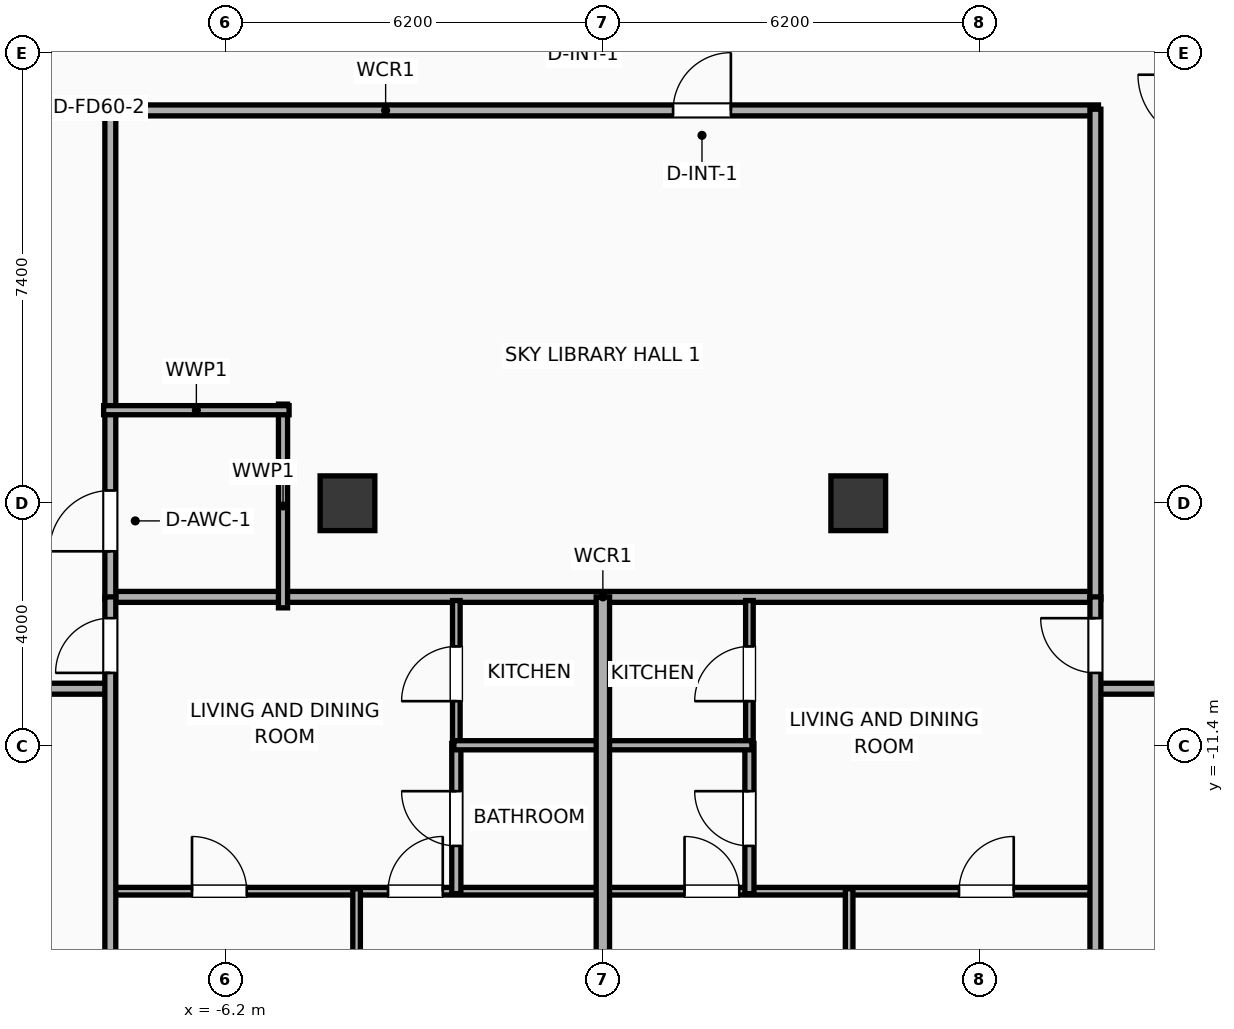
"""IFC4 building model, lengths in metres.
Left out: names, types, materials, properties, quantities, classifications, styles, units other than length and angle.
Written with IfcOpenShell. Run it as: python <this file> out.ifc"""

import sys

from ifc_helpers import new_model, si_unit, direction, frame, frame_2d, origin, origin_2d, place, context, subcontext, project, spatial, rectangle, extrude, element, fill, save


model = new_model("IFC4")
c1 = context("Model", 3, precision=1e-05, world=origin(), true_north=direction((0.0, 1.0)))
c2 = subcontext(c1, "Body", "Model", "MODEL_VIEW")
j1 = project(units=[si_unit("LENGTHUNIT", "METRE"), si_unit("PLANEANGLEUNIT", "RADIAN")], contexts=[c1])
p1 = place(None, origin())
s1 = spatial("IfcSite", under=j1, at=p1, CompositionType="ELEMENT")
p2 = place(p1, origin())
s2 = spatial("IfcBuilding", under=s1, at=p2, CompositionType="ELEMENT")
p3 = place(p2, frame((0.0, 0.0, 163.8)))
s3 = spatial("IfcBuildingStorey", under=s2, at=p3, CompositionType="ELEMENT", Elevation=163.8)
for number, where, z_axis, x_axis in (
    (1, (-4.2, -7.4, 0.0), (0.0, 0.0, 1.0), (1.0, 0.0, 0.0)),
    (2, (4.2, -7.4, 0.0), (0.0, 0.0, 1.0), (1.0, 0.0, 0.0)),
):
    element("IfcColumn", number, at=place(p3, frame(where, z_axis=z_axis, x_axis=x_axis)), inside=s3, PredefinedType="COLUMN", context=c2, shape_type="SweptSolid", body=[
        extrude(rectangle(XDim=0.9, YDim=0.9, at=origin_2d()), origin(), (0.0, 0.0, 1.0), 3.9),
    ])
p4 = place(p3, frame((-8.15, -8.94, 0.0), z_axis=(0.0, 0.0, 1.0), x_axis=(1.0, 0.0, 0.0)))
e3 = element("IfcWall", 3, at=p4, inside=s3, PredefinedType="PARTITIONING", context=c2, shape_type="SweptSolid", body=[
    extrude(rectangle(XDim=16.3, YDim=0.18, at=frame_2d((8.15, 0.0))), origin(), (0.0, 0.0, 1.0), 3.65),
])
p5 = place(p3, frame((-8.15, -0.94, 0.0), z_axis=(0.0, 0.0, 1.0), x_axis=(1.0, 0.0, 0.0)))
e4 = element("IfcWall", 4, at=p5, inside=s3, PredefinedType="PARTITIONING", context=c2, shape_type="SweptSolid", body=[
    extrude(rectangle(XDim=16.3, YDim=0.18, at=frame_2d((8.15, 0.0))), origin(), (0.0, 0.0, 1.0), 3.65),
])
p6 = place(p5, frame((9.305, 0.0, 0.0)))
e5 = element("IfcOpeningElement", 5, at=p6, cuts=e4, PredefinedType="OPENING", context=c2, shape_type="SweptSolid", body=[
    extrude(rectangle(XDim=0.95, YDim=2.05, at=frame_2d((0.475, 1.025))), frame((0.0, 0.1, 0.0), z_axis=(0.0, -1.0, 0.0), x_axis=(1.0, 0.0, 0.0)), (0.0, 0.0, 1.0), 0.2),
])
p7 = place(p3, frame((-8.1, -8.98, 0.0), z_axis=(0.0, 0.0, 1.0), x_axis=(0.0, 1.0, 0.0)))
e6 = element("IfcWall", 6, at=p7, inside=s3, PredefinedType="PARTITIONING", context=c2, shape_type="SweptSolid", body=[
    extrude(rectangle(XDim=8.06, YDim=0.18, at=frame_2d((4.03, 0.0))), origin(), (0.0, 0.0, 1.0), 3.65),
])
p8 = place(p7, frame((0.79, 0.0, 0.0)))
e7 = element("IfcOpeningElement", 7, at=p8, cuts=e6, PredefinedType="OPENING", context=c2, shape_type="SweptSolid", body=[
    extrude(rectangle(XDim=1.0, YDim=2.05, at=frame_2d((0.5, 1.025))), frame((0.0, 0.1, 0.0), z_axis=(0.0, -1.0, 0.0), x_axis=(1.0, 0.0, 0.0)), (0.0, 0.0, 1.0), 0.2),
])
p9 = place(p3, frame((8.1, -8.98, 0.0), z_axis=(0.0, 0.0, 1.0), x_axis=(0.0, 1.0, 0.0)))
e8 = element("IfcWall", 8, at=p9, inside=s3, PredefinedType="PARTITIONING", context=c2, shape_type="SweptSolid", body=[
    extrude(rectangle(XDim=8.06, YDim=0.18, at=frame_2d((4.03, 0.0))), origin(), (0.0, 0.0, 1.0), 3.65),
])
p10 = place(p3, frame((-5.26, -9.12, 0.0), z_axis=(0.0, 0.0, 1.0), x_axis=(0.0, 1.0, 0.0)))
e9 = element("IfcWall", 9, at=p10, inside=s3, PredefinedType="PLUMBINGWALL", context=c2, shape_type="SweptSolid", body=[
    extrude(rectangle(XDim=3.35, YDim=0.15, at=frame_2d((1.675, 0.0))), origin(), (0.0, 0.0, 1.0), 3.65),
])
p11 = place(p3, frame((-8.21, -5.87, 0.0), z_axis=(0.0, 0.0, 1.0), x_axis=(1.0, 0.0, 0.0)))
e10 = element("IfcWall", 10, at=p11, inside=s3, PredefinedType="PLUMBINGWALL", context=c2, shape_type="SweptSolid", body=[
    extrude(rectangle(XDim=3.05, YDim=0.15, at=frame_2d((1.525, 0.0))), origin(), (0.0, 0.0, 1.0), 3.65),
])
p12 = place(p3, frame((-19.75, -10.45, 0.0), z_axis=(0.0, 0.0, 1.0), x_axis=(1.0, 0.0, 0.0)))
e11 = element("IfcWall", 11, at=p12, inside=s3, PredefinedType="PARTITIONING", context=c2, shape_type="SweptSolid", body=[
    extrude(rectangle(XDim=11.67, YDim=0.18, at=frame_2d((5.835, 0.0))), origin(), (0.0, 0.0, 1.0), 3.65),
])
p13 = place(p12, frame((2.664, 0.0, 0.0)))
e12 = element("IfcOpeningElement", 12, at=p13, cuts=e11, PredefinedType="OPENING", context=c2, shape_type="SweptSolid", body=[
    extrude(rectangle(XDim=0.9, YDim=2.05, at=frame_2d((0.45, 1.025))), frame((0.0, 0.1, 0.0), z_axis=(0.0, -1.0, 0.0), x_axis=(1.0, 0.0, 0.0)), (0.0, 0.0, 1.0), 0.2),
])
p14 = place(p12, frame((9.404, 0.0, 0.0)))
e13 = element("IfcOpeningElement", 13, at=p14, cuts=e11, PredefinedType="OPENING", context=c2, shape_type="SweptSolid", body=[
    extrude(rectangle(XDim=1.15, YDim=2.05, at=frame_2d((0.575, 1.025))), frame((0.0, 0.1, 0.0), z_axis=(0.0, -1.0, 0.0), x_axis=(1.0, 0.0, 0.0)), (0.0, 0.0, 1.0), 0.2),
])
p15 = place(p3, frame((8.08, -10.45, 0.0), z_axis=(0.0, 0.0, 1.0), x_axis=(1.0, 0.0, 0.0)))
e14 = element("IfcWall", 14, at=p15, inside=s3, PredefinedType="PARTITIONING", context=c2, shape_type="SweptSolid", body=[
    extrude(rectangle(XDim=11.67, YDim=0.18, at=frame_2d((5.835, 0.0))), origin(), (0.0, 0.0, 1.0), 3.65),
])
p16 = place(p15, frame((1.213, 0.0, 0.0)))
e15 = element("IfcOpeningElement", 15, at=p16, cuts=e14, PredefinedType="OPENING", context=c2, shape_type="SweptSolid", body=[
    extrude(rectangle(XDim=1.15, YDim=2.05, at=frame_2d((0.575, 1.025))), frame((0.0, 0.1, 0.0), z_axis=(0.0, -1.0, 0.0), x_axis=(1.0, 0.0, 0.0)), (0.0, 0.0, 1.0), 0.2),
])
p17 = place(p15, frame((7.057, 0.0, 0.0)))
e16 = element("IfcOpeningElement", 16, at=p17, cuts=e14, PredefinedType="OPENING", context=c2, shape_type="SweptSolid", body=[
    extrude(rectangle(XDim=1.15, YDim=2.05, at=frame_2d((0.575, 1.025))), frame((0.0, 0.1, 0.0), z_axis=(0.0, -1.0, 0.0), x_axis=(1.0, 0.0, 0.0)), (0.0, 0.0, 1.0), 0.2),
])
p18 = place(p3, frame((-8.08, -13.78, 0.0), z_axis=(0.0, 0.0, 1.0), x_axis=(1.0, 0.0, 0.0)))
e17 = element("IfcWall", 17, at=p18, inside=s3, PredefinedType="PARTITIONING", context=c2, shape_type="SweptSolid", body=[
    extrude(rectangle(XDim=8.06, YDim=0.125, at=frame_2d((4.03, 0.0))), origin(), (0.0, 0.0, 1.0), 3.65),
])
p19 = place(p18, frame((1.323, 0.0, 0.0)))
e18 = element("IfcOpeningElement", 18, at=p19, cuts=e17, PredefinedType="OPENING", context=c2, shape_type="SweptSolid", body=[
    extrude(rectangle(XDim=0.9, YDim=2.05, at=frame_2d((0.45, 1.025))), frame((0.0, 0.073, 0.0), z_axis=(0.0, -1.0, 0.0), x_axis=(1.0, 0.0, 0.0)), (0.0, 0.0, 1.0), 0.145),
])
p20 = place(p18, frame((4.547, 0.0, 0.0)))
e19 = element("IfcOpeningElement", 19, at=p20, cuts=e17, PredefinedType="OPENING", context=c2, shape_type="SweptSolid", body=[
    extrude(rectangle(XDim=0.9, YDim=2.05, at=frame_2d((0.45, 1.025))), frame((0.0, 0.073, 0.0), z_axis=(0.0, -1.0, 0.0), x_axis=(1.0, 0.0, 0.0)), (0.0, 0.0, 1.0), 0.145),
])
p21 = place(p3, frame((-2.41, -11.41, 0.0), z_axis=(0.0, 0.0, 1.0), x_axis=(0.0, 1.0, 0.0)))
e20 = element("IfcWall", 20, at=p21, inside=s3, PredefinedType="PARTITIONING", context=c2, shape_type="SweptSolid", body=[
    extrude(rectangle(XDim=2.41, YDim=0.125, at=frame_2d((1.205, 0.0))), origin(), (0.0, 0.0, 1.0), 3.65),
])
p22 = place(p21, frame((0.755, 0.0, 0.0)))
e21 = element("IfcOpeningElement", 21, at=p22, cuts=e20, PredefinedType="OPENING", context=c2, shape_type="SweptSolid", body=[
    extrude(rectangle(XDim=0.9, YDim=2.05, at=frame_2d((0.45, 1.025))), frame((0.0, 0.073, 0.0), z_axis=(0.0, -1.0, 0.0), x_axis=(1.0, 0.0, 0.0)), (0.0, 0.0, 1.0), 0.145),
])
p23 = place(p3, frame((-2.41, -13.82, 0.0), z_axis=(0.0, 0.0, 1.0), x_axis=(0.0, 1.0, 0.0)))
e22 = element("IfcWall", 22, at=p23, inside=s3, PredefinedType="PLUMBINGWALL", context=c2, shape_type="SweptSolid", body=[
    extrude(rectangle(XDim=2.47, YDim=0.15, at=frame_2d((1.235, 0.0))), origin(), (0.0, 0.0, 1.0), 3.65),
])
p24 = place(p23, frame((0.785, 0.0, 0.0)))
e23 = element("IfcOpeningElement", 23, at=p24, cuts=e22, PredefinedType="OPENING", context=c2, shape_type="SweptSolid", body=[
    extrude(rectangle(XDim=0.9, YDim=2.05, at=frame_2d((0.45, 1.025))), frame((0.0, 0.085, 0.0), z_axis=(0.0, -1.0, 0.0), x_axis=(1.0, 0.0, 0.0)), (0.0, 0.0, 1.0), 0.17),
])
p25 = place(p3, frame((-2.45, -11.38, 0.0), z_axis=(0.0, 0.0, 1.0), x_axis=(1.0, 0.0, 0.0)))
e24 = element("IfcWall", 24, at=p25, inside=s3, PredefinedType="PLUMBINGWALL", context=c2, shape_type="SweptSolid", body=[
    extrude(rectangle(XDim=2.43, YDim=0.15, at=frame_2d((1.215, 0.0))), origin(), (0.0, 0.0, 1.0), 3.65),
])
p26 = place(p3, frame((-4.05, -21.031, 0.0), z_axis=(0.0, 0.0, 1.0), x_axis=(0.0, 1.0, 0.0)))
e25 = element("IfcWall", 25, at=p26, inside=s3, PredefinedType="PARTITIONING", context=c2, shape_type="SweptSolid", body=[
    extrude(rectangle(XDim=7.291, YDim=0.125, at=frame_2d((3.646, 0.0))), origin(), (0.0, 0.0, 1.0), 3.65),
])
p27 = place(p3, frame((-8.1, -21.456, 0.0), z_axis=(0.0, 0.0, 1.0), x_axis=(0.0, 1.0, 0.0)))
e26 = element("IfcWall", 26, at=p27, inside=s3, PredefinedType="PARTITIONING", context=c2, shape_type="SweptSolid", body=[
    extrude(rectangle(XDim=12.516, YDim=0.18, at=frame_2d((6.258, 0.0))), origin(), (0.0, 0.0, 1.0), 3.65),
])
p28 = place(p27, frame((11.267, 0.0, 0.0)))
e27 = element("IfcOpeningElement", 27, at=p28, cuts=e26, PredefinedType="OPENING", context=c2, shape_type="SweptSolid", body=[
    extrude(rectangle(XDim=0.9, YDim=2.05, at=frame_2d((0.45, 1.025))), frame((0.0, 0.1, 0.0), z_axis=(0.0, -1.0, 0.0), x_axis=(1.0, 0.0, 0.0)), (0.0, 0.0, 1.0), 0.2),
])
p29 = place(p3, frame((0.02, -13.78, 0.0), z_axis=(0.0, 0.0, 1.0), x_axis=(1.0, 0.0, 0.0)))
e28 = element("IfcWall", 28, at=p29, inside=s3, PredefinedType="PARTITIONING", context=c2, shape_type="SweptSolid", body=[
    extrude(rectangle(XDim=8.06, YDim=0.125, at=frame_2d((4.03, 0.0))), origin(), (0.0, 0.0, 1.0), 3.65),
])
p30 = place(p29, frame((1.323, 0.0, 0.0)))
e29 = element("IfcOpeningElement", 29, at=p30, cuts=e28, PredefinedType="OPENING", context=c2, shape_type="SweptSolid", body=[
    extrude(rectangle(XDim=0.9, YDim=2.05, at=frame_2d((0.45, 1.025))), frame((0.0, 0.073, 0.0), z_axis=(0.0, -1.0, 0.0), x_axis=(1.0, 0.0, 0.0)), (0.0, 0.0, 1.0), 0.145),
])
p31 = place(p29, frame((5.837, 0.0, 0.0)))
e30 = element("IfcOpeningElement", 30, at=p31, cuts=e28, PredefinedType="OPENING", context=c2, shape_type="SweptSolid", body=[
    extrude(rectangle(XDim=0.9, YDim=2.05, at=frame_2d((0.45, 1.025))), frame((0.0, 0.073, 0.0), z_axis=(0.0, -1.0, 0.0), x_axis=(1.0, 0.0, 0.0)), (0.0, 0.0, 1.0), 0.145),
])
p32 = place(p3, frame((2.41, -11.41, 0.0), z_axis=(0.0, 0.0, 1.0), x_axis=(0.0, 1.0, 0.0)))
e31 = element("IfcWall", 31, at=p32, inside=s3, PredefinedType="PARTITIONING", context=c2, shape_type="SweptSolid", body=[
    extrude(rectangle(XDim=2.41, YDim=0.125, at=frame_2d((1.205, 0.0))), origin(), (0.0, 0.0, 1.0), 3.65),
])
p33 = place(p32, frame((0.755, 0.0, 0.0)))
e32 = element("IfcOpeningElement", 32, at=p33, cuts=e31, PredefinedType="OPENING", context=c2, shape_type="SweptSolid", body=[
    extrude(rectangle(XDim=0.9, YDim=2.05, at=frame_2d((0.45, 1.025))), frame((0.0, 0.073, 0.0), z_axis=(0.0, -1.0, 0.0), x_axis=(1.0, 0.0, 0.0)), (0.0, 0.0, 1.0), 0.145),
])
p34 = place(p3, frame((2.41, -13.82, 0.0), z_axis=(0.0, 0.0, 1.0), x_axis=(0.0, 1.0, 0.0)))
e33 = element("IfcWall", 33, at=p34, inside=s3, PredefinedType="PLUMBINGWALL", context=c2, shape_type="SweptSolid", body=[
    extrude(rectangle(XDim=2.47, YDim=0.15, at=frame_2d((1.235, 0.0))), origin(), (0.0, 0.0, 1.0), 3.65),
])
p35 = place(p34, frame((0.785, 0.0, 0.0)))
e34 = element("IfcOpeningElement", 34, at=p35, cuts=e33, PredefinedType="OPENING", context=c2, shape_type="SweptSolid", body=[
    extrude(rectangle(XDim=0.9, YDim=2.05, at=frame_2d((0.45, 1.025))), frame((0.0, 0.085, 0.0), z_axis=(0.0, -1.0, 0.0), x_axis=(1.0, 0.0, 0.0)), (0.0, 0.0, 1.0), 0.17),
])
p36 = place(p3, frame((0.02, -11.38, 0.0), z_axis=(0.0, 0.0, 1.0), x_axis=(1.0, 0.0, 0.0)))
e35 = element("IfcWall", 35, at=p36, inside=s3, PredefinedType="PLUMBINGWALL", context=c2, shape_type="SweptSolid", body=[
    extrude(rectangle(XDim=2.43, YDim=0.15, at=frame_2d((1.215, 0.0))), origin(), (0.0, 0.0, 1.0), 3.65),
])
p37 = place(p3, frame((4.05, -20.179, 0.0), z_axis=(0.0, 0.0, 1.0), x_axis=(0.0, 1.0, 0.0)))
e36 = element("IfcWall", 36, at=p37, inside=s3, PredefinedType="PARTITIONING", context=c2, shape_type="SweptSolid", body=[
    extrude(rectangle(XDim=6.439, YDim=0.125, at=frame_2d((3.22, 0.0))), origin(), (0.0, 0.0, 1.0), 3.04),
])
p38 = place(p3, frame((8.1, -19.754, 0.0), z_axis=(0.0, 0.0, 1.0), x_axis=(0.0, 1.0, 0.0)))
e37 = element("IfcWall", 37, at=p38, inside=s3, PredefinedType="PARTITIONING", context=c2, shape_type="SweptSolid", body=[
    extrude(rectangle(XDim=10.814, YDim=0.18, at=frame_2d((5.407, 0.0))), origin(), (0.0, 0.0, 1.0), 3.65),
])
p39 = place(p38, frame((9.564, 0.0, 0.0)))
e38 = element("IfcOpeningElement", 38, at=p39, cuts=e37, PredefinedType="OPENING", context=c2, shape_type="SweptSolid", body=[
    extrude(rectangle(XDim=0.9, YDim=2.05, at=frame_2d((0.45, 1.025))), frame((0.0, 0.1, 0.0), z_axis=(0.0, -1.0, 0.0), x_axis=(1.0, 0.0, 0.0)), (0.0, 0.0, 1.0), 0.2),
])
p40 = place(p3, frame((0.0, -20.605, 0.0), z_axis=(0.0, 0.0, 1.0), x_axis=(0.0, 1.0, 0.0)))
e39 = element("IfcWall", 39, at=p40, inside=s3, PredefinedType="PARTITIONING", context=c2, shape_type="SweptSolid", body=[
    extrude(rectangle(XDim=11.665, YDim=0.22, at=frame_2d((5.833, 0.0))), origin(), (0.0, 0.0, 1.0), 3.65),
])
p41 = place(p6, origin())
e40 = element("IfcDoor", 40, at=p41, inside=s3, OperationType="SINGLE_SWING_RIGHT", PredefinedType="DOOR", context=c2, shape_type="SweptSolid", body=[
    extrude(rectangle(XDim=0.95, YDim=2.05, at=frame_2d((0.475, 1.025))), frame((0.0, 0.025, 0.0), z_axis=(0.0, -1.0, 0.0), x_axis=(1.0, 0.0, 0.0)), (0.0, 0.0, 1.0), 0.05),
])
fill(e5, e40)
p42 = place(p8, origin())
e41 = element("IfcDoor", 41, at=p42, inside=s3, OperationType="SINGLE_SWING_LEFT", PredefinedType="DOOR", context=c2, shape_type="SweptSolid", body=[
    extrude(rectangle(XDim=1.0, YDim=2.05, at=frame_2d((0.5, 1.025))), frame((0.0, 0.025, 0.0), z_axis=(0.0, -1.0, 0.0), x_axis=(1.0, 0.0, 0.0)), (0.0, 0.0, 1.0), 0.05),
])
fill(e7, e41)
p43 = place(p19, origin())
e42 = element("IfcDoor", 42, at=p43, inside=s3, OperationType="SINGLE_SWING_LEFT", PredefinedType="DOOR", context=c2, shape_type="SweptSolid", body=[
    extrude(rectangle(XDim=0.9, YDim=2.05, at=frame_2d((0.45, 1.025))), frame((0.0, 0.025, 0.0), z_axis=(0.0, -1.0, 0.0), x_axis=(1.0, 0.0, 0.0)), (0.0, 0.0, 1.0), 0.05),
])
fill(e18, e42)
p44 = place(p20, origin())
e43 = element("IfcDoor", 43, at=p44, inside=s3, OperationType="SINGLE_SWING_RIGHT", PredefinedType="DOOR", context=c2, shape_type="SweptSolid", body=[
    extrude(rectangle(XDim=0.9, YDim=2.05, at=frame_2d((0.45, 1.025))), frame((0.0, 0.025, 0.0), z_axis=(0.0, -1.0, 0.0), x_axis=(1.0, 0.0, 0.0)), (0.0, 0.0, 1.0), 0.05),
])
fill(e19, e43)
p45 = place(p22, origin())
e44 = element("IfcDoor", 44, at=p45, inside=s3, OperationType="SINGLE_SWING_LEFT", PredefinedType="DOOR", context=c2, shape_type="SweptSolid", body=[
    extrude(rectangle(XDim=0.9, YDim=2.05, at=frame_2d((0.45, 1.025))), frame((0.0, 0.025, 0.0), z_axis=(0.0, -1.0, 0.0), x_axis=(1.0, 0.0, 0.0)), (0.0, 0.0, 1.0), 0.05),
])
fill(e21, e44)
p46 = place(p24, origin())
e45 = element("IfcDoor", 45, at=p46, inside=s3, OperationType="SINGLE_SWING_RIGHT", PredefinedType="DOOR", context=c2, shape_type="SweptSolid", body=[
    extrude(rectangle(XDim=0.9, YDim=2.05, at=frame_2d((0.45, 1.025))), frame((0.0, 0.025, 0.0), z_axis=(0.0, -1.0, 0.0), x_axis=(1.0, 0.0, 0.0)), (0.0, 0.0, 1.0), 0.05),
])
fill(e23, e45)
p47 = place(p28, origin())
e46 = element("IfcDoor", 46, at=p47, inside=s3, OperationType="SINGLE_SWING_LEFT", PredefinedType="DOOR", context=c2, shape_type="SweptSolid", body=[
    extrude(rectangle(XDim=0.9, YDim=2.05, at=frame_2d((0.45, 1.025))), frame((0.0, 0.025, 0.0), z_axis=(0.0, -1.0, 0.0), x_axis=(1.0, 0.0, 0.0)), (0.0, 0.0, 1.0), 0.05),
])
fill(e27, e46)
p48 = place(p30, origin())
e47 = element("IfcDoor", 47, at=p48, inside=s3, OperationType="SINGLE_SWING_LEFT", PredefinedType="DOOR", context=c2, shape_type="SweptSolid", body=[
    extrude(rectangle(XDim=0.9, YDim=2.05, at=frame_2d((0.45, 1.025))), frame((0.0, 0.025, 0.0), z_axis=(0.0, -1.0, 0.0), x_axis=(1.0, 0.0, 0.0)), (0.0, 0.0, 1.0), 0.05),
])
fill(e29, e47)
p49 = place(p31, origin())
e48 = element("IfcDoor", 48, at=p49, inside=s3, OperationType="SINGLE_SWING_RIGHT", PredefinedType="DOOR", context=c2, shape_type="SweptSolid", body=[
    extrude(rectangle(XDim=0.9, YDim=2.05, at=frame_2d((0.45, 1.025))), frame((0.0, 0.025, 0.0), z_axis=(0.0, -1.0, 0.0), x_axis=(1.0, 0.0, 0.0)), (0.0, 0.0, 1.0), 0.05),
])
fill(e30, e48)
p50 = place(p33, origin())
e49 = element("IfcDoor", 49, at=p50, inside=s3, OperationType="SINGLE_SWING_LEFT", PredefinedType="DOOR", context=c2, shape_type="SweptSolid", body=[
    extrude(rectangle(XDim=0.9, YDim=2.05, at=frame_2d((0.45, 1.025))), frame((0.0, 0.025, 0.0), z_axis=(0.0, -1.0, 0.0), x_axis=(1.0, 0.0, 0.0)), (0.0, 0.0, 1.0), 0.05),
])
fill(e32, e49)
p51 = place(p35, origin())
e50 = element("IfcDoor", 50, at=p51, inside=s3, OperationType="SINGLE_SWING_RIGHT", PredefinedType="DOOR", context=c2, shape_type="SweptSolid", body=[
    extrude(rectangle(XDim=0.9, YDim=2.05, at=frame_2d((0.45, 1.025))), frame((0.0, 0.025, 0.0), z_axis=(0.0, -1.0, 0.0), x_axis=(1.0, 0.0, 0.0)), (0.0, 0.0, 1.0), 0.05),
])
fill(e34, e50)
p52 = place(p39, origin())
e51 = element("IfcDoor", 51, at=p52, inside=s3, OperationType="SINGLE_SWING_RIGHT", PredefinedType="DOOR", context=c2, shape_type="SweptSolid", body=[
    extrude(rectangle(XDim=0.9, YDim=2.05, at=frame_2d((0.45, 1.025))), frame((0.0, 0.025, 0.0), z_axis=(0.0, -1.0, 0.0), x_axis=(1.0, 0.0, 0.0)), (0.0, 0.0, 1.0), 0.05),
])
fill(e38, e51)
save(model, sys.argv[1])
